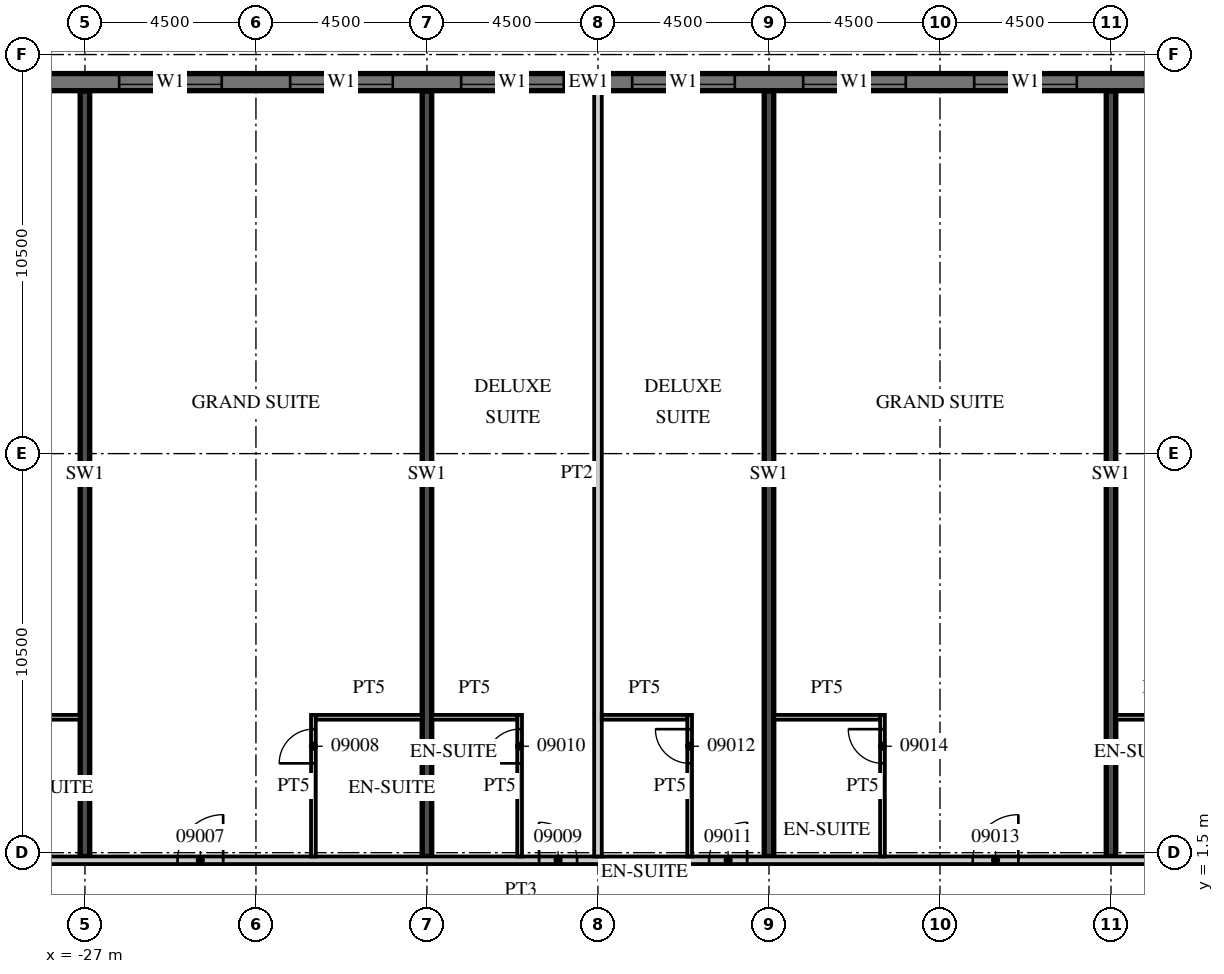
"""IFC4 building model, lengths in metres.
Left out: names, types, materials, properties, quantities, classifications, styles, units other than length and angle.
Written with IfcOpenShell. Run it as: python <this file> out.ifc"""

import sys

from ifc_helpers import new_model, si_unit, direction, frame, frame_2d, origin, place, context, subcontext, project, spatial, rectangle, extrude, element, fill, save


model = new_model("IFC4")
c1 = context("Model", 3, precision=1e-05, world=origin(), true_north=direction((0.0, 1.0)))
c2 = subcontext(c1, "Body", "Model", "MODEL_VIEW")
j1 = project(units=[si_unit("LENGTHUNIT", "METRE"), si_unit("PLANEANGLEUNIT", "RADIAN")], contexts=[c1])
p1 = place(None, origin())
s1 = spatial("IfcSite", under=j1, at=p1, CompositionType="ELEMENT")
p2 = place(p1, origin())
s2 = spatial("IfcBuilding", under=s1, at=p2, CompositionType="ELEMENT")
p3 = place(p2, frame((0.0, 0.0, 60.0)))
s3 = spatial("IfcBuildingStorey", under=s2, at=p3, CompositionType="ELEMENT", Elevation=60.0)
for number, where, z_axis, x_axis in (
    (1, (-27.0, 1.4, 0.0), (0.0, 0.0, 1.0), (0.0, 1.0, 0.0)),
    (2, (-18.0, 1.4, 0.0), (0.0, 0.0, 1.0), (0.0, 1.0, 0.0)),
    (3, (-9.0, 1.4, 0.0), (0.0, 0.0, 1.0), (0.0, 1.0, 0.0)),
    (4, (0.0, 1.4, 0.0), (0.0, 0.0, 1.0), (0.0, 1.0, 0.0)),
):
    element("IfcWall", number, at=place(p3, frame(where, z_axis=z_axis, x_axis=x_axis)), inside=s3, PredefinedType="SHEAR", context=c2, shape_type="SweptSolid", body=[
        extrude(rectangle(XDim=20.14, YDim=0.25, at=frame_2d((10.07, 0.0))), origin(), (0.0, 0.0, 1.0), 3.3),
    ])
p4 = place(p3, frame((13.5, 21.775, 0.0), z_axis=(0.0, 0.0, 1.0), x_axis=(-1.0, 0.0, 0.0)))
e5 = element("IfcWall", 5, at=p4, inside=s3, PredefinedType="SOLIDWALL", context=c2, shape_type="SweptSolid", body=[
    extrude(rectangle(XDim=54.5, YDim=0.45, at=frame_2d((27.25, 0.0))), origin(), (0.0, 0.0, 1.0), 3.02),
])
p5 = place(p4, frame((0.9, 0.0, 0.45)))
e6 = element("IfcOpeningElement", 6, at=p5, cuts=e5, PredefinedType="OPENING", context=c2, shape_type="SweptSolid", body=[
    extrude(rectangle(XDim=2.7, YDim=2.25, at=frame_2d((1.35, 1.125))), frame((0.0, 0.235, 0.0), z_axis=(0.0, -1.0, 0.0), x_axis=(1.0, 0.0, 0.0)), (0.0, 0.0, 1.0), 0.47),
])
p6 = place(p4, frame((5.4, 0.0, 0.45)))
e7 = element("IfcOpeningElement", 7, at=p6, cuts=e5, PredefinedType="OPENING", context=c2, shape_type="SweptSolid", body=[
    extrude(rectangle(XDim=2.7, YDim=2.25, at=frame_2d((1.35, 1.125))), frame((0.0, 0.235, 0.0), z_axis=(0.0, -1.0, 0.0), x_axis=(1.0, 0.0, 0.0)), (0.0, 0.0, 1.0), 0.47),
])
p7 = place(p4, frame((9.9, 0.0, 0.45)))
e8 = element("IfcOpeningElement", 8, at=p7, cuts=e5, PredefinedType="OPENING", context=c2, shape_type="SweptSolid", body=[
    extrude(rectangle(XDim=2.7, YDim=2.25, at=frame_2d((1.35, 1.125))), frame((0.0, 0.235, 0.0), z_axis=(0.0, -1.0, 0.0), x_axis=(1.0, 0.0, 0.0)), (0.0, 0.0, 1.0), 0.47),
])
p8 = place(p4, frame((14.4, 0.0, 0.45)))
e9 = element("IfcOpeningElement", 9, at=p8, cuts=e5, PredefinedType="OPENING", context=c2, shape_type="SweptSolid", body=[
    extrude(rectangle(XDim=2.7, YDim=2.25, at=frame_2d((1.35, 1.125))), frame((0.0, 0.235, 0.0), z_axis=(0.0, -1.0, 0.0), x_axis=(1.0, 0.0, 0.0)), (0.0, 0.0, 1.0), 0.47),
])
p9 = place(p4, frame((18.9, 0.0, 0.45)))
e10 = element("IfcOpeningElement", 10, at=p9, cuts=e5, PredefinedType="OPENING", context=c2, shape_type="SweptSolid", body=[
    extrude(rectangle(XDim=2.7, YDim=2.25, at=frame_2d((1.35, 1.125))), frame((0.0, 0.235, 0.0), z_axis=(0.0, -1.0, 0.0), x_axis=(1.0, 0.0, 0.0)), (0.0, 0.0, 1.0), 0.47),
])
p10 = place(p4, frame((23.4, 0.0, 0.45)))
e11 = element("IfcOpeningElement", 11, at=p10, cuts=e5, PredefinedType="OPENING", context=c2, shape_type="SweptSolid", body=[
    extrude(rectangle(XDim=2.7, YDim=2.25, at=frame_2d((1.35, 1.125))), frame((0.0, 0.235, 0.0), z_axis=(0.0, -1.0, 0.0), x_axis=(1.0, 0.0, 0.0)), (0.0, 0.0, 1.0), 0.47),
])
p11 = place(p4, frame((27.9, 0.0, 0.45)))
e12 = element("IfcOpeningElement", 12, at=p11, cuts=e5, PredefinedType="OPENING", context=c2, shape_type="SweptSolid", body=[
    extrude(rectangle(XDim=2.7, YDim=2.25, at=frame_2d((1.35, 1.125))), frame((0.0, 0.235, 0.0), z_axis=(0.0, -1.0, 0.0), x_axis=(1.0, 0.0, 0.0)), (0.0, 0.0, 1.0), 0.47),
])
p12 = place(p4, frame((32.4, 0.0, 0.45)))
e13 = element("IfcOpeningElement", 13, at=p12, cuts=e5, PredefinedType="OPENING", context=c2, shape_type="SweptSolid", body=[
    extrude(rectangle(XDim=2.7, YDim=2.25, at=frame_2d((1.35, 1.125))), frame((0.0, 0.235, 0.0), z_axis=(0.0, -1.0, 0.0), x_axis=(1.0, 0.0, 0.0)), (0.0, 0.0, 1.0), 0.47),
])
p13 = place(p4, frame((36.9, 0.0, 0.45)))
e14 = element("IfcOpeningElement", 14, at=p13, cuts=e5, PredefinedType="OPENING", context=c2, shape_type="SweptSolid", body=[
    extrude(rectangle(XDim=2.7, YDim=2.25, at=frame_2d((1.35, 1.125))), frame((0.0, 0.235, 0.0), z_axis=(0.0, -1.0, 0.0), x_axis=(1.0, 0.0, 0.0)), (0.0, 0.0, 1.0), 0.47),
])
p14 = place(p4, frame((41.4, 0.0, 0.45)))
e15 = element("IfcOpeningElement", 15, at=p14, cuts=e5, PredefinedType="OPENING", context=c2, shape_type="SweptSolid", body=[
    extrude(rectangle(XDim=2.7, YDim=2.25, at=frame_2d((1.35, 1.125))), frame((0.0, 0.235, 0.0), z_axis=(0.0, -1.0, 0.0), x_axis=(1.0, 0.0, 0.0)), (0.0, 0.0, 1.0), 0.47),
])
p15 = place(p4, frame((45.9, 0.0, 0.45)))
e16 = element("IfcOpeningElement", 16, at=p15, cuts=e5, PredefinedType="OPENING", context=c2, shape_type="SweptSolid", body=[
    extrude(rectangle(XDim=2.7, YDim=2.25, at=frame_2d((1.35, 1.125))), frame((0.0, 0.235, 0.0), z_axis=(0.0, -1.0, 0.0), x_axis=(1.0, 0.0, 0.0)), (0.0, 0.0, 1.0), 0.47),
])
p16 = place(p4, frame((50.4, 0.0, 0.45)))
e17 = element("IfcOpeningElement", 17, at=p16, cuts=e5, PredefinedType="OPENING", context=c2, shape_type="SweptSolid", body=[
    extrude(rectangle(XDim=2.7, YDim=2.25, at=frame_2d((1.35, 1.125))), frame((0.0, 0.235, 0.0), z_axis=(0.0, -1.0, 0.0), x_axis=(1.0, 0.0, 0.0)), (0.0, 0.0, 1.0), 0.47),
])
p17 = place(p3, frame((-44.55, 1.3, 0.0), z_axis=(0.0, 0.0, 1.0), x_axis=(1.0, 0.0, 0.0)))
e18 = element("IfcWall", 18, at=p17, inside=s3, PredefinedType="PARTITIONING", context=c2, shape_type="SweptSolid", body=[
    extrude(rectangle(XDim=58.05, YDim=0.2, at=frame_2d((29.025, 0.0))), origin(), (0.0, 0.0, 1.0), 3.02),
])
p18 = place(p17, frame((0.525, 0.0, 0.0)))
e19 = element("IfcOpeningElement", 19, at=p18, cuts=e18, PredefinedType="OPENING", context=c2, shape_type="SweptSolid", body=[
    extrude(rectangle(XDim=1.0, YDim=2.1, at=frame_2d((0.5, 1.05))), frame((0.0, 0.11, 0.0), z_axis=(0.0, -1.0, 0.0), x_axis=(1.0, 0.0, 0.0)), (0.0, 0.0, 1.0), 0.22),
])
p19 = place(p17, frame((6.975, 0.0, 0.0)))
e20 = element("IfcOpeningElement", 20, at=p19, cuts=e18, PredefinedType="OPENING", context=c2, shape_type="SweptSolid", body=[
    extrude(rectangle(XDim=1.0, YDim=2.1, at=frame_2d((0.5, 1.05))), frame((0.0, 0.11, 0.0), z_axis=(0.0, -1.0, 0.0), x_axis=(1.0, 0.0, 0.0)), (0.0, 0.0, 1.0), 0.22),
])
p20 = place(p17, frame((10.987, 0.0, 0.0)))
e21 = element("IfcOpeningElement", 21, at=p20, cuts=e18, PredefinedType="OPENING", context=c2, shape_type="SweptSolid", body=[
    extrude(rectangle(XDim=1.2, YDim=2.1, at=frame_2d((0.6, 1.05))), frame((0.0, 0.11, 0.0), z_axis=(0.0, -1.0, 0.0), x_axis=(1.0, 0.0, 0.0)), (0.0, 0.0, 1.0), 0.22),
])
p21 = place(p17, frame((19.987, 0.0, 0.0)))
e22 = element("IfcOpeningElement", 22, at=p21, cuts=e18, PredefinedType="OPENING", context=c2, shape_type="SweptSolid", body=[
    extrude(rectangle(XDim=1.2, YDim=2.1, at=frame_2d((0.6, 1.05))), frame((0.0, 0.11, 0.0), z_axis=(0.0, -1.0, 0.0), x_axis=(1.0, 0.0, 0.0)), (0.0, 0.0, 1.0), 0.22),
])
p22 = place(p17, frame((29.5, 0.0, 0.0)))
e23 = element("IfcOpeningElement", 23, at=p22, cuts=e18, PredefinedType="OPENING", context=c2, shape_type="SweptSolid", body=[
    extrude(rectangle(XDim=1.0, YDim=2.1, at=frame_2d((0.5, 1.05))), frame((0.0, 0.11, 0.0), z_axis=(0.0, -1.0, 0.0), x_axis=(1.0, 0.0, 0.0)), (0.0, 0.0, 1.0), 0.22),
])
p23 = place(p17, frame((33.975, 0.0, 0.0)))
e24 = element("IfcOpeningElement", 24, at=p23, cuts=e18, PredefinedType="OPENING", context=c2, shape_type="SweptSolid", body=[
    extrude(rectangle(XDim=1.0, YDim=2.1, at=frame_2d((0.5, 1.05))), frame((0.0, 0.11, 0.0), z_axis=(0.0, -1.0, 0.0), x_axis=(1.0, 0.0, 0.0)), (0.0, 0.0, 1.0), 0.22),
])
p24 = place(p17, frame((40.912, 0.0, 0.0)))
e25 = element("IfcOpeningElement", 25, at=p24, cuts=e18, PredefinedType="OPENING", context=c2, shape_type="SweptSolid", body=[
    extrude(rectangle(XDim=1.2, YDim=2.1, at=frame_2d((0.6, 1.05))), frame((0.0, 0.11, 0.0), z_axis=(0.0, -1.0, 0.0), x_axis=(1.0, 0.0, 0.0)), (0.0, 0.0, 1.0), 0.22),
])
p25 = place(p17, frame((47.5, 0.0, 0.0)))
e26 = element("IfcOpeningElement", 26, at=p25, cuts=e18, PredefinedType="OPENING", context=c2, shape_type="SweptSolid", body=[
    extrude(rectangle(XDim=1.0, YDim=2.1, at=frame_2d((0.5, 1.05))), frame((0.0, 0.11, 0.0), z_axis=(0.0, -1.0, 0.0), x_axis=(1.0, 0.0, 0.0)), (0.0, 0.0, 1.0), 0.22),
])
p26 = place(p17, frame((51.975, 0.0, 0.0)))
e27 = element("IfcOpeningElement", 27, at=p26, cuts=e18, PredefinedType="OPENING", context=c2, shape_type="SweptSolid", body=[
    extrude(rectangle(XDim=1.0, YDim=2.1, at=frame_2d((0.5, 1.05))), frame((0.0, 0.11, 0.0), z_axis=(0.0, -1.0, 0.0), x_axis=(1.0, 0.0, 0.0)), (0.0, 0.0, 1.0), 0.22),
])
p27 = place(p17, frame((56.475, 0.0, 0.0)))
e28 = element("IfcOpeningElement", 28, at=p27, cuts=e18, PredefinedType="OPENING", context=c2, shape_type="SweptSolid", body=[
    extrude(rectangle(XDim=1.0, YDim=2.1, at=frame_2d((0.5, 1.05))), frame((0.0, 0.11, 0.0), z_axis=(0.0, -1.0, 0.0), x_axis=(1.0, 0.0, 0.0)), (0.0, 0.0, 1.0), 0.22),
])
p28 = place(p3, frame((-29.925, 5.062, 0.0), z_axis=(0.0, 0.0, 1.0), x_axis=(1.0, 0.0, 0.0)))
e29 = element("IfcWall", 29, at=p28, inside=s3, PredefinedType="PARTITIONING", context=c2, shape_type="SweptSolid", body=[
    extrude(rectangle(XDim=2.8, YDim=0.125, at=frame_2d((1.4, 0.0))), origin(), (0.0, 0.0, 1.0), 3.02),
])
p29 = place(p3, frame((-20.988, 1.4, 0.0), z_axis=(0.0, 0.0, 1.0), x_axis=(0.0, 1.0, 0.0)))
e30 = element("IfcWall", 30, at=p29, inside=s3, PredefinedType="PARTITIONING", context=c2, shape_type="SweptSolid", body=[
    extrude(rectangle(XDim=3.725, YDim=0.125, at=frame_2d((1.863, 0.0))), origin(), (0.0, 0.0, 1.0), 3.02),
])
p30 = place(p29, frame((2.45, 0.0, 0.0)))
e31 = element("IfcOpeningElement", 31, at=p30, cuts=e30, PredefinedType="OPENING", context=c2, shape_type="SweptSolid", body=[
    extrude(rectangle(XDim=0.9, YDim=2.1, at=frame_2d((0.45, 1.05))), frame((0.0, 0.073, 0.0), z_axis=(0.0, -1.0, 0.0), x_axis=(1.0, 0.0, 0.0)), (0.0, 0.0, 1.0), 0.145),
])
p31 = place(p3, frame((-20.925, 5.062, 0.0), z_axis=(0.0, 0.0, 1.0), x_axis=(1.0, 0.0, 0.0)))
e32 = element("IfcWall", 32, at=p31, inside=s3, PredefinedType="PARTITIONING", context=c2, shape_type="SweptSolid", body=[
    extrude(rectangle(XDim=2.8, YDim=0.125, at=frame_2d((1.4, 0.0))), origin(), (0.0, 0.0, 1.0), 3.02),
])
p32 = place(p3, frame((-13.5, 1.4, 0.0), z_axis=(0.0, 0.0, 1.0), x_axis=(0.0, 1.0, 0.0)))
e33 = element("IfcWall", 33, at=p32, inside=s3, PredefinedType="PARTITIONING", context=c2, shape_type="SweptSolid", body=[
    extrude(rectangle(XDim=20.15, YDim=0.2, at=frame_2d((10.075, 0.0))), origin(), (0.0, 0.0, 1.0), 3.02),
])
p33 = place(p3, frame((-15.562, 1.4, 0.0), z_axis=(0.0, 0.0, 1.0), x_axis=(0.0, 1.0, 0.0)))
e34 = element("IfcWall", 34, at=p33, inside=s3, PredefinedType="PARTITIONING", context=c2, shape_type="SweptSolid", body=[
    extrude(rectangle(XDim=3.725, YDim=0.125, at=frame_2d((1.863, 0.0))), origin(), (0.0, 0.0, 1.0), 3.02),
])
p34 = place(p33, frame((2.45, 0.0, 0.0)))
e35 = element("IfcOpeningElement", 35, at=p34, cuts=e34, PredefinedType="OPENING", context=c2, shape_type="SweptSolid", body=[
    extrude(rectangle(XDim=0.9, YDim=2.1, at=frame_2d((0.45, 1.05))), frame((0.0, 0.073, 0.0), z_axis=(0.0, -1.0, 0.0), x_axis=(1.0, 0.0, 0.0)), (0.0, 0.0, 1.0), 0.145),
])
p35 = place(p3, frame((-17.875, 5.062, 0.0), z_axis=(0.0, 0.0, 1.0), x_axis=(1.0, 0.0, 0.0)))
e36 = element("IfcWall", 36, at=p35, inside=s3, PredefinedType="PARTITIONING", context=c2, shape_type="SweptSolid", body=[
    extrude(rectangle(XDim=2.25, YDim=0.125, at=frame_2d((1.125, 0.0))), origin(), (0.0, 0.0, 1.0), 3.02),
])
p36 = place(p3, frame((-11.088, 1.4, 0.0), z_axis=(0.0, 0.0, 1.0), x_axis=(0.0, 1.0, 0.0)))
e37 = element("IfcWall", 37, at=p36, inside=s3, PredefinedType="PARTITIONING", context=c2, shape_type="SweptSolid", body=[
    extrude(rectangle(XDim=3.725, YDim=0.125, at=frame_2d((1.863, 0.0))), origin(), (0.0, 0.0, 1.0), 3.02),
])
p37 = place(p36, frame((2.45, 0.0, 0.0)))
e38 = element("IfcOpeningElement", 38, at=p37, cuts=e37, PredefinedType="OPENING", context=c2, shape_type="SweptSolid", body=[
    extrude(rectangle(XDim=0.9, YDim=2.1, at=frame_2d((0.45, 1.05))), frame((0.0, 0.073, 0.0), z_axis=(0.0, -1.0, 0.0), x_axis=(1.0, 0.0, 0.0)), (0.0, 0.0, 1.0), 0.145),
])
p38 = place(p3, frame((-13.4, 5.062, 0.0), z_axis=(0.0, 0.0, 1.0), x_axis=(1.0, 0.0, 0.0)))
e39 = element("IfcWall", 39, at=p38, inside=s3, PredefinedType="PARTITIONING", context=c2, shape_type="SweptSolid", body=[
    extrude(rectangle(XDim=2.25, YDim=0.125, at=frame_2d((1.125, 0.0))), origin(), (0.0, 0.0, 1.0), 3.02),
])
p39 = place(p3, frame((-6.013, 1.4, 0.0), z_axis=(0.0, 0.0, 1.0), x_axis=(0.0, 1.0, 0.0)))
e40 = element("IfcWall", 40, at=p39, inside=s3, PredefinedType="PARTITIONING", context=c2, shape_type="SweptSolid", body=[
    extrude(rectangle(XDim=3.725, YDim=0.125, at=frame_2d((1.863, 0.0))), origin(), (0.0, 0.0, 1.0), 3.02),
])
p40 = place(p39, frame((2.45, 0.0, 0.0)))
e41 = element("IfcOpeningElement", 41, at=p40, cuts=e40, PredefinedType="OPENING", context=c2, shape_type="SweptSolid", body=[
    extrude(rectangle(XDim=0.9, YDim=2.1, at=frame_2d((0.45, 1.05))), frame((0.0, 0.073, 0.0), z_axis=(0.0, -1.0, 0.0), x_axis=(1.0, 0.0, 0.0)), (0.0, 0.0, 1.0), 0.145),
])
p41 = place(p3, frame((-8.875, 5.062, 0.0), z_axis=(0.0, 0.0, 1.0), x_axis=(1.0, 0.0, 0.0)))
e42 = element("IfcWall", 42, at=p41, inside=s3, PredefinedType="PARTITIONING", context=c2, shape_type="SweptSolid", body=[
    extrude(rectangle(XDim=2.8, YDim=0.125, at=frame_2d((1.4, 0.0))), origin(), (0.0, 0.0, 1.0), 3.02),
])
p42 = place(p3, frame((0.125, 5.062, 0.0), z_axis=(0.0, 0.0, 1.0), x_axis=(1.0, 0.0, 0.0)))
e43 = element("IfcWall", 43, at=p42, inside=s3, PredefinedType="PARTITIONING", context=c2, shape_type="SweptSolid", body=[
    extrude(rectangle(XDim=2.25, YDim=0.125, at=frame_2d((1.125, 0.0))), origin(), (0.0, 0.0, 1.0), 3.02),
])
p43 = place(p8, origin())
e44 = element("IfcWindow", 44, at=p43, inside=s3, PartitioningType="SINGLE_PANEL", PredefinedType="WINDOW", context=c2, shape_type="SweptSolid", body=[
    extrude(rectangle(XDim=2.7, YDim=2.25, at=frame_2d((1.35, 1.125))), frame((0.0, 0.09, 0.0), z_axis=(0.0, -1.0, 0.0), x_axis=(1.0, 0.0, 0.0)), (0.0, 0.0, 1.0), 0.06),
])
fill(e9, e44)
p44 = place(p9, origin())
e45 = element("IfcWindow", 45, at=p44, inside=s3, PartitioningType="SINGLE_PANEL", PredefinedType="WINDOW", context=c2, shape_type="SweptSolid", body=[
    extrude(rectangle(XDim=2.7, YDim=2.25, at=frame_2d((1.35, 1.125))), frame((0.0, 0.09, 0.0), z_axis=(0.0, -1.0, 0.0), x_axis=(1.0, 0.0, 0.0)), (0.0, 0.0, 1.0), 0.06),
])
fill(e10, e45)
p45 = place(p10, origin())
e46 = element("IfcWindow", 46, at=p45, inside=s3, PartitioningType="SINGLE_PANEL", PredefinedType="WINDOW", context=c2, shape_type="SweptSolid", body=[
    extrude(rectangle(XDim=2.7, YDim=2.25, at=frame_2d((1.35, 1.125))), frame((0.0, 0.09, 0.0), z_axis=(0.0, -1.0, 0.0), x_axis=(1.0, 0.0, 0.0)), (0.0, 0.0, 1.0), 0.06),
])
fill(e11, e46)
p46 = place(p11, origin())
e47 = element("IfcWindow", 47, at=p46, inside=s3, PartitioningType="SINGLE_PANEL", PredefinedType="WINDOW", context=c2, shape_type="SweptSolid", body=[
    extrude(rectangle(XDim=2.7, YDim=2.25, at=frame_2d((1.35, 1.125))), frame((0.0, 0.09, 0.0), z_axis=(0.0, -1.0, 0.0), x_axis=(1.0, 0.0, 0.0)), (0.0, 0.0, 1.0), 0.06),
])
fill(e12, e47)
p47 = place(p12, origin())
e48 = element("IfcWindow", 48, at=p47, inside=s3, PartitioningType="SINGLE_PANEL", PredefinedType="WINDOW", context=c2, shape_type="SweptSolid", body=[
    extrude(rectangle(XDim=2.7, YDim=2.25, at=frame_2d((1.35, 1.125))), frame((0.0, 0.09, 0.0), z_axis=(0.0, -1.0, 0.0), x_axis=(1.0, 0.0, 0.0)), (0.0, 0.0, 1.0), 0.06),
])
fill(e13, e48)
p48 = place(p13, origin())
e49 = element("IfcWindow", 49, at=p48, inside=s3, PartitioningType="SINGLE_PANEL", PredefinedType="WINDOW", context=c2, shape_type="SweptSolid", body=[
    extrude(rectangle(XDim=2.7, YDim=2.25, at=frame_2d((1.35, 1.125))), frame((0.0, 0.09, 0.0), z_axis=(0.0, -1.0, 0.0), x_axis=(1.0, 0.0, 0.0)), (0.0, 0.0, 1.0), 0.06),
])
fill(e14, e49)
p49 = place(p21, origin())
e50 = element("IfcDoor", 50, at=p49, inside=s3, OperationType="SINGLE_SWING_RIGHT", PredefinedType="DOOR", context=c2, shape_type="SweptSolid", body=[
    extrude(rectangle(XDim=1.2, YDim=2.1, at=frame_2d((0.6, 1.05))), frame((0.0, 0.025, 0.0), z_axis=(0.0, -1.0, 0.0), x_axis=(1.0, 0.0, 0.0)), (0.0, 0.0, 1.0), 0.05),
])
fill(e22, e50)
p50 = place(p30, origin())
e51 = element("IfcDoor", 51, at=p50, inside=s3, OperationType="SINGLE_SWING_LEFT", PredefinedType="DOOR", context=c2, shape_type="SweptSolid", body=[
    extrude(rectangle(XDim=0.9, YDim=2.1, at=frame_2d((0.45, 1.05))), frame((0.0, 0.025, 0.0), z_axis=(0.0, -1.0, 0.0), x_axis=(1.0, 0.0, 0.0)), (0.0, 0.0, 1.0), 0.05),
])
fill(e31, e51)
p51 = place(p22, origin())
e52 = element("IfcDoor", 52, at=p51, inside=s3, OperationType="SINGLE_SWING_LEFT", PredefinedType="DOOR", context=c2, shape_type="SweptSolid", body=[
    extrude(rectangle(XDim=1.0, YDim=2.1, at=frame_2d((0.5, 1.05))), frame((0.0, 0.025, 0.0), z_axis=(0.0, -1.0, 0.0), x_axis=(1.0, 0.0, 0.0)), (0.0, 0.0, 1.0), 0.05),
])
fill(e23, e52)
p52 = place(p34, origin())
e53 = element("IfcDoor", 53, at=p52, inside=s3, OperationType="SINGLE_SWING_LEFT", PredefinedType="DOOR", context=c2, shape_type="SweptSolid", body=[
    extrude(rectangle(XDim=0.9, YDim=2.1, at=frame_2d((0.45, 1.05))), frame((0.0, 0.025, 0.0), z_axis=(0.0, -1.0, 0.0), x_axis=(1.0, 0.0, 0.0)), (0.0, 0.0, 1.0), 0.05),
])
fill(e35, e53)
p53 = place(p23, origin())
e54 = element("IfcDoor", 54, at=p53, inside=s3, OperationType="SINGLE_SWING_RIGHT", PredefinedType="DOOR", context=c2, shape_type="SweptSolid", body=[
    extrude(rectangle(XDim=1.0, YDim=2.1, at=frame_2d((0.5, 1.05))), frame((0.0, 0.025, 0.0), z_axis=(0.0, -1.0, 0.0), x_axis=(1.0, 0.0, 0.0)), (0.0, 0.0, 1.0), 0.05),
])
fill(e24, e54)
p54 = place(p37, origin())
e55 = element("IfcDoor", 55, at=p54, inside=s3, OperationType="SINGLE_SWING_RIGHT", PredefinedType="DOOR", context=c2, shape_type="SweptSolid", body=[
    extrude(rectangle(XDim=0.9, YDim=2.1, at=frame_2d((0.45, 1.05))), frame((0.0, 0.025, 0.0), z_axis=(0.0, -1.0, 0.0), x_axis=(1.0, 0.0, 0.0)), (0.0, 0.0, 1.0), 0.05),
])
fill(e38, e55)
p55 = place(p24, origin())
e56 = element("IfcDoor", 56, at=p55, inside=s3, OperationType="SINGLE_SWING_RIGHT", PredefinedType="DOOR", context=c2, shape_type="SweptSolid", body=[
    extrude(rectangle(XDim=1.2, YDim=2.1, at=frame_2d((0.6, 1.05))), frame((0.0, 0.025, 0.0), z_axis=(0.0, -1.0, 0.0), x_axis=(1.0, 0.0, 0.0)), (0.0, 0.0, 1.0), 0.05),
])
fill(e25, e56)
p56 = place(p40, origin())
e57 = element("IfcDoor", 57, at=p56, inside=s3, OperationType="SINGLE_SWING_RIGHT", PredefinedType="DOOR", context=c2, shape_type="SweptSolid", body=[
    extrude(rectangle(XDim=0.9, YDim=2.1, at=frame_2d((0.45, 1.05))), frame((0.0, 0.025, 0.0), z_axis=(0.0, -1.0, 0.0), x_axis=(1.0, 0.0, 0.0)), (0.0, 0.0, 1.0), 0.05),
])
fill(e41, e57)
save(model, sys.argv[1])
